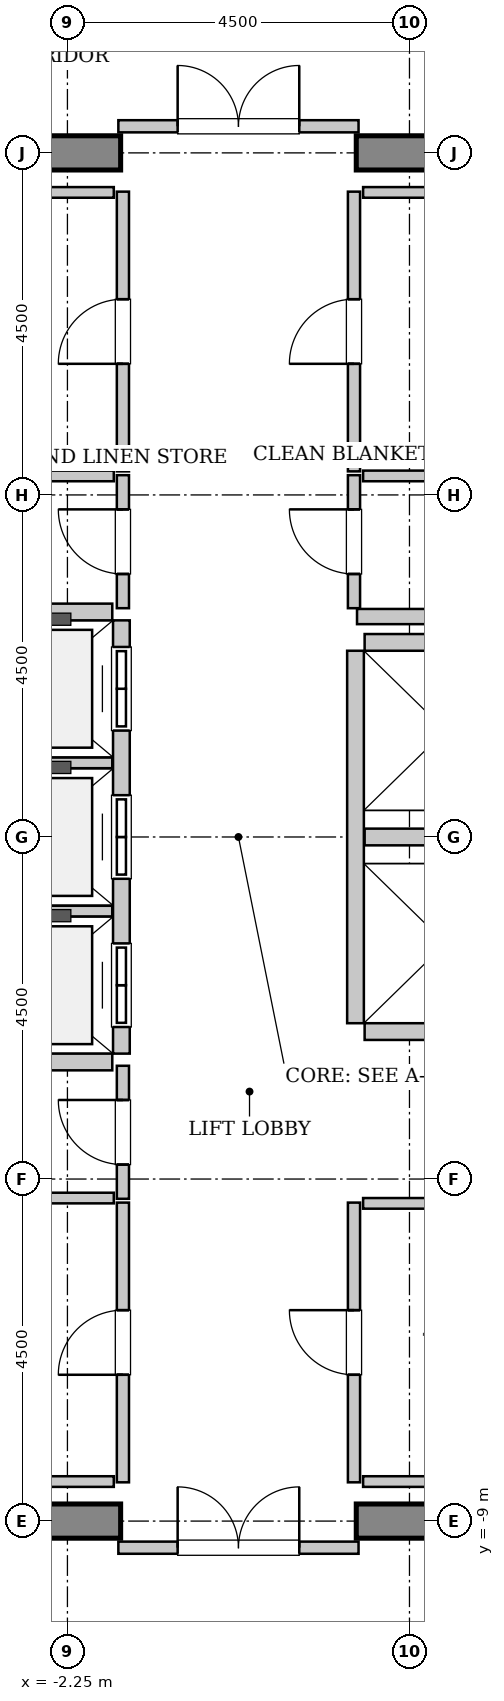
"""IFC4 building model, lengths in metres.
Left out: names, types, materials, properties, quantities, classifications, styles, units other than length and angle.
Written with IfcOpenShell. Run it as: python <this file> out.ifc"""

import sys

from ifc_helpers import new_model, si_unit, direction, frame, frame_2d, origin, place, context, subcontext, project, spatial, rectangle, extrude, source, transform, mapped, element, fill, save


model = new_model("IFC4")
c1 = context("Model", 3, precision=1e-05, world=origin(), true_north=direction((0.0, 1.0)))
c2 = subcontext(c1, "Body", "Model", "MODEL_VIEW")
j1 = project(units=[si_unit("LENGTHUNIT", "METRE"), si_unit("PLANEANGLEUNIT", "RADIAN")], contexts=[c1])
p1 = place(None, origin())
s1 = spatial("IfcSite", under=j1, at=p1, CompositionType="ELEMENT")
p2 = place(p1, origin())
s2 = spatial("IfcBuilding", under=s1, at=p2, CompositionType="ELEMENT")
p3 = place(p2, frame((0.0, 0.0, 298.8)))
s3 = spatial("IfcBuildingStorey", under=s2, at=p3, CompositionType="ELEMENT", Elevation=298.8)
m1 = source(origin(), c2, "Body", "SweptSolid", [
    extrude(rectangle(XDim=9.925, YDim=0.45, at=frame_2d((4.962, 0.0))), origin(), (0.0, 0.0, 1.0), 3.8),
])
for number, where, z_axis, x_axis in (
    (1, (-11.475, 9.0, 0.0), (0.0, 0.0, 1.0), (1.0, 0.0, 0.0)),
    (2, (1.55, 9.0, 0.0), (0.0, 0.0, 1.0), (1.0, 0.0, 0.0)),
    (3, (-11.475, -9.0, 0.0), (0.0, 0.0, 1.0), (1.0, 0.0, 0.0)),
    (4, (1.55, -9.0, 0.0), (0.0, 0.0, 1.0), (1.0, 0.0, 0.0)),
):
    element("IfcWall", number, at=place(p3, frame(where, z_axis=z_axis, x_axis=x_axis)), inside=s3, PredefinedType="SHEAR", context=c2, shape_type="MappedRepresentation", body=[
        mapped(m1, transform((0.0, 0.0, 0.0), x_axis=(1.0, 0.0, 0.0), y_axis=(0.0, 1.0, 0.0), z_axis=(0.0, 0.0, 1.0), scale=1.0)),
    ])
m2 = source(origin(), c2, "Body", "SweptSolid", [
    extrude(rectangle(XDim=5.7, YDim=0.22, at=frame_2d((2.85, 0.0))), origin(), (0.0, 0.0, 1.0), 3.535),
])
p4 = place(p3, frame((-1.54, -2.85, 0.0), z_axis=(0.0, 0.0, 1.0), x_axis=(0.0, 1.0, 0.0)))
e5 = element("IfcWall", 5, at=p4, inside=s3, PredefinedType="SOLIDWALL", context=c2, shape_type="MappedRepresentation", body=[
    mapped(m2, transform((0.0, 0.0, 0.0), x_axis=(1.0, 0.0, 0.0), y_axis=(0.0, 1.0, 0.0), z_axis=(0.0, 0.0, 1.0), scale=1.0)),
])
p5 = place(p4, frame((0.35, 0.0, 0.0)))
e6 = element("IfcOpeningElement", 6, at=p5, cuts=e5, PredefinedType="OPENING", context=c2, shape_type="SweptSolid", body=[
    extrude(rectangle(XDim=1.1, YDim=2.2, at=frame_2d((0.55, 1.1))), frame((0.0, 0.12, 0.0), z_axis=(0.0, -1.0, 0.0), x_axis=(1.0, 0.0, 0.0)), (0.0, 0.0, 1.0), 0.24),
])
p6 = place(p4, frame((2.3, 0.0, 0.0)))
e7 = element("IfcOpeningElement", 7, at=p6, cuts=e5, PredefinedType="OPENING", context=c2, shape_type="SweptSolid", body=[
    extrude(rectangle(XDim=1.1, YDim=2.2, at=frame_2d((0.55, 1.1))), frame((0.0, 0.12, 0.0), z_axis=(0.0, -1.0, 0.0), x_axis=(1.0, 0.0, 0.0)), (0.0, 0.0, 1.0), 0.24),
])
p7 = place(p4, frame((4.25, 0.0, 0.0)))
e8 = element("IfcOpeningElement", 8, at=p7, cuts=e5, PredefinedType="OPENING", context=c2, shape_type="SweptSolid", body=[
    extrude(rectangle(XDim=1.1, YDim=2.2, at=frame_2d((0.55, 1.1))), frame((0.0, 0.12, 0.0), z_axis=(0.0, -1.0, 0.0), x_axis=(1.0, 0.0, 0.0)), (0.0, 0.0, 1.0), 0.24),
])
m3 = source(origin(), c2, "Body", "SweptSolid", [
    extrude(rectangle(XDim=2.13, YDim=0.22, at=frame_2d((1.065, 0.0))), origin(), (0.0, 0.0, 1.0), 3.535),
])
p8 = place(p3, frame((-3.79, -2.96, 0.0), z_axis=(0.0, 0.0, 1.0), x_axis=(1.0, 0.0, 0.0)))
e9 = element("IfcWall", 9, at=p8, inside=s3, PredefinedType="SOLIDWALL", context=c2, shape_type="MappedRepresentation", body=[
    mapped(m3, transform((0.0, 0.0, 0.0), x_axis=(1.0, 0.0, 0.0), y_axis=(0.0, 1.0, 0.0), z_axis=(0.0, 0.0, 1.0), scale=1.0)),
])
m4 = source(origin(), c2, "Body", "SweptSolid", [
    extrude(rectangle(XDim=2.13, YDim=0.14, at=frame_2d((1.065, 0.0))), origin(), (0.0, 0.0, 1.0), 3.535),
])
for number, where, z_axis, x_axis in (
    (10, (-3.79, -0.975, 0.0), (0.0, 0.0, 1.0), (1.0, 0.0, 0.0)),
    (11, (-3.79, 0.975, 0.0), (0.0, 0.0, 1.0), (1.0, 0.0, 0.0)),
):
    element("IfcWall", number, at=place(p3, frame(where, z_axis=z_axis, x_axis=x_axis)), inside=s3, PredefinedType="PARTITIONING", context=c2, shape_type="MappedRepresentation", body=[
        mapped(m4, transform((0.0, 0.0, 0.0), x_axis=(1.0, 0.0, 0.0), y_axis=(0.0, 1.0, 0.0), z_axis=(0.0, 0.0, 1.0), scale=1.0)),
    ])
p9 = place(p3, frame((-1.66, 2.96, 0.0), z_axis=(0.0, 0.0, 1.0), x_axis=(-1.0, 0.0, 0.0)))
e12 = element("IfcWall", 12, at=p9, inside=s3, PredefinedType="SOLIDWALL", context=c2, shape_type="MappedRepresentation", body=[
    mapped(m3, transform((0.0, 0.0, 0.0), x_axis=(1.0, 0.0, 0.0), y_axis=(0.0, 1.0, 0.0), z_axis=(0.0, 0.0, 1.0), scale=1.0)),
])
m5 = source(origin(), c2, "Body", "SweptSolid", [
    extrude(rectangle(XDim=4.9, YDim=0.22, at=frame_2d((2.45, 0.0))), origin(), (0.0, 0.0, 1.0), 3.535),
])
p10 = place(p3, frame((1.54, 2.45, 0.0), z_axis=(0.0, 0.0, 1.0), x_axis=(0.0, -1.0, 0.0)))
e13 = element("IfcWall", 13, at=p10, inside=s3, PredefinedType="SOLIDWALL", context=c2, shape_type="MappedRepresentation", body=[
    mapped(m5, transform((0.0, 0.0, 0.0), x_axis=(1.0, 0.0, 0.0), y_axis=(0.0, 1.0, 0.0), z_axis=(0.0, 0.0, 1.0), scale=1.0)),
])
for number, where, z_axis, x_axis in (
    (14, (1.66, -2.56, 0.0), (0.0, 0.0, 1.0), (1.0, 0.0, 0.0)),
    (15, (1.66, 0.0, 0.0), (0.0, 0.0, 1.0), (1.0, 0.0, 0.0)),
    (16, (3.79, 2.56, 0.0), (0.0, 0.0, 1.0), (-1.0, 0.0, 0.0)),
):
    element("IfcWall", number, at=place(p3, frame(where, z_axis=z_axis, x_axis=x_axis)), inside=s3, PredefinedType="SOLIDWALL", context=c2, shape_type="MappedRepresentation", body=[
        mapped(m3, transform((0.0, 0.0, 0.0), x_axis=(1.0, 0.0, 0.0), y_axis=(0.0, 1.0, 0.0), z_axis=(0.0, 0.0, 1.0), scale=1.0)),
    ])
m6 = source(origin(), c2, "Body", "SweptSolid", [
    extrude(rectangle(XDim=2.52, YDim=0.2, at=frame_2d((1.26, 0.0))), origin(), (0.0, 0.0, 1.0), 3.535),
])
p11 = place(p3, frame((1.56, 2.9, 0.0), z_axis=(0.0, 0.0, 1.0), x_axis=(1.0, 0.0, 0.0)))
e17 = element("IfcWall", 17, at=p11, inside=s3, PredefinedType="PARTITIONING", context=c2, shape_type="MappedRepresentation", body=[
    mapped(m6, transform((0.0, 0.0, 0.0), x_axis=(1.0, 0.0, 0.0), y_axis=(0.0, 1.0, 0.0), z_axis=(0.0, 0.0, 1.0), scale=1.0)),
])
m7 = source(origin(), c2, "Body", "SweptSolid", [
    extrude(rectangle(XDim=3.16, YDim=0.16, at=frame_2d((1.58, 0.0))), origin(), (0.0, 0.0, 1.0), 2.625),
])
p12 = place(p3, frame((-1.58, 9.35, 0.0), z_axis=(0.0, 0.0, 1.0), x_axis=(1.0, 0.0, 0.0)))
e18 = element("IfcWall", 18, at=p12, inside=s3, PredefinedType="PARTITIONING", context=c2, shape_type="MappedRepresentation", body=[
    mapped(m7, transform((0.0, 0.0, 0.0), x_axis=(1.0, 0.0, 0.0), y_axis=(0.0, 1.0, 0.0), z_axis=(0.0, 0.0, 1.0), scale=1.0)),
])
p13 = place(p12, frame((0.78, 0.0, 0.0)))
e19 = element("IfcOpeningElement", 19, at=p13, cuts=e18, PredefinedType="OPENING", context=c2, shape_type="SweptSolid", body=[
    extrude(rectangle(XDim=1.6, YDim=2.3, at=frame_2d((0.8, 1.15))), frame((0.0, 0.09, 0.0), z_axis=(0.0, -1.0, 0.0), x_axis=(1.0, 0.0, 0.0)), (0.0, 0.0, 1.0), 0.18),
])
p14 = place(p3, frame((-1.58, -9.35, 0.0), z_axis=(0.0, 0.0, 1.0), x_axis=(1.0, 0.0, 0.0)))
e20 = element("IfcWall", 20, at=p14, inside=s3, PredefinedType="PARTITIONING", context=c2, shape_type="MappedRepresentation", body=[
    mapped(m7, transform((0.0, 0.0, 0.0), x_axis=(1.0, 0.0, 0.0), y_axis=(0.0, 1.0, 0.0), z_axis=(0.0, 0.0, 1.0), scale=1.0)),
])
p15 = place(p14, frame((0.78, 0.0, 0.0)))
e21 = element("IfcOpeningElement", 21, at=p15, cuts=e20, PredefinedType="OPENING", context=c2, shape_type="SweptSolid", body=[
    extrude(rectangle(XDim=1.6, YDim=2.3, at=frame_2d((0.8, 1.15))), frame((0.0, 0.09, 0.0), z_axis=(0.0, -1.0, 0.0), x_axis=(1.0, 0.0, 0.0)), (0.0, 0.0, 1.0), 0.18),
])
m8 = source(origin(), c2, "Body", "SweptSolid", [
    extrude(rectangle(XDim=1.75, YDim=0.16, at=frame_2d((0.875, 0.0))), origin(), (0.0, 0.0, 1.0), 3.535),
])
p16 = place(p3, frame((-1.52, 3.01, 0.0), z_axis=(0.0, 0.0, 1.0), x_axis=(0.0, 1.0, 0.0)))
e22 = element("IfcWall", 22, at=p16, inside=s3, PredefinedType="PARTITIONING", context=c2, shape_type="MappedRepresentation", body=[
    mapped(m8, transform((0.0, 0.0, 0.0), x_axis=(1.0, 0.0, 0.0), y_axis=(0.0, 1.0, 0.0), z_axis=(0.0, 0.0, 1.0), scale=1.0)),
])
p17 = place(p16, frame((0.45, 0.0, 0.0)))
e23 = element("IfcOpeningElement", 23, at=p17, cuts=e22, PredefinedType="OPENING", context=c2, shape_type="SweptSolid", body=[
    extrude(rectangle(XDim=0.85, YDim=2.1, at=frame_2d((0.425, 1.05))), frame((0.0, 0.09, 0.0), z_axis=(0.0, -1.0, 0.0), x_axis=(1.0, 0.0, 0.0)), (0.0, 0.0, 1.0), 0.18),
])
m9 = source(origin(), c2, "Body", "SweptSolid", [
    extrude(rectangle(XDim=2.95, YDim=0.14, at=frame_2d((1.475, 0.0))), origin(), (0.0, 0.0, 1.0), 3.535),
])
p18 = place(p3, frame((-4.59, 4.75, 0.0), z_axis=(0.0, 0.0, 1.0), x_axis=(1.0, 0.0, 0.0)))
e24 = element("IfcWall", 24, at=p18, inside=s3, PredefinedType="PARTITIONING", context=c2, shape_type="MappedRepresentation", body=[
    mapped(m9, transform((0.0, 0.0, 0.0), x_axis=(1.0, 0.0, 0.0), y_axis=(0.0, 1.0, 0.0), z_axis=(0.0, 0.0, 1.0), scale=1.0)),
])
m10 = source(origin(), c2, "Body", "SweptSolid", [
    extrude(rectangle(XDim=3.68, YDim=0.16, at=frame_2d((1.84, 0.0))), origin(), (0.0, 0.0, 1.0), 3.535),
])
p19 = place(p3, frame((-1.52, 4.81, 0.0), z_axis=(0.0, 0.0, 1.0), x_axis=(0.0, 1.0, 0.0)))
e25 = element("IfcWall", 25, at=p19, inside=s3, PredefinedType="PARTITIONING", context=c2, shape_type="MappedRepresentation", body=[
    mapped(m10, transform((0.0, 0.0, 0.0), x_axis=(1.0, 0.0, 0.0), y_axis=(0.0, 1.0, 0.0), z_axis=(0.0, 0.0, 1.0), scale=1.0)),
])
p20 = place(p19, frame((1.415, 0.0, 0.0)))
e26 = element("IfcOpeningElement", 26, at=p20, cuts=e25, PredefinedType="OPENING", context=c2, shape_type="SweptSolid", body=[
    extrude(rectangle(XDim=0.85, YDim=2.1, at=frame_2d((0.425, 1.05))), frame((0.0, 0.09, 0.0), z_axis=(0.0, -1.0, 0.0), x_axis=(1.0, 0.0, 0.0)), (0.0, 0.0, 1.0), 0.18),
])
m11 = source(origin(), c2, "Body", "SweptSolid", [
    extrude(rectangle(XDim=3.15, YDim=0.14, at=frame_2d((1.575, 0.0))), origin(), (0.0, 0.0, 1.0), 3.535),
])
p21 = place(p3, frame((-4.79, 8.48, 0.0), z_axis=(0.0, 0.0, 1.0), x_axis=(1.0, 0.0, 0.0)))
e27 = element("IfcWall", 27, at=p21, inside=s3, PredefinedType="PARTITIONING", context=c2, shape_type="MappedRepresentation", body=[
    mapped(m11, transform((0.0, 0.0, 0.0), x_axis=(1.0, 0.0, 0.0), y_axis=(0.0, 1.0, 0.0), z_axis=(0.0, 0.0, 1.0), scale=1.0)),
])
p22 = place(p3, frame((1.52, 3.01, 0.0), z_axis=(0.0, 0.0, 1.0), x_axis=(0.0, 1.0, 0.0)))
e28 = element("IfcWall", 28, at=p22, inside=s3, PredefinedType="PARTITIONING", context=c2, shape_type="MappedRepresentation", body=[
    mapped(m8, transform((0.0, 0.0, 0.0), x_axis=(1.0, 0.0, 0.0), y_axis=(0.0, 1.0, 0.0), z_axis=(0.0, 0.0, 1.0), scale=1.0)),
])
p23 = place(p22, frame((0.45, 0.0, 0.0)))
e29 = element("IfcOpeningElement", 29, at=p23, cuts=e28, PredefinedType="OPENING", context=c2, shape_type="SweptSolid", body=[
    extrude(rectangle(XDim=0.85, YDim=2.1, at=frame_2d((0.425, 1.05))), frame((0.0, 0.09, 0.0), z_axis=(0.0, -1.0, 0.0), x_axis=(1.0, 0.0, 0.0)), (0.0, 0.0, 1.0), 0.18),
])
p24 = place(p3, frame((1.64, 4.75, 0.0), z_axis=(0.0, 0.0, 1.0), x_axis=(1.0, 0.0, 0.0)))
e30 = element("IfcWall", 30, at=p24, inside=s3, PredefinedType="PARTITIONING", context=c2, shape_type="MappedRepresentation", body=[
    mapped(m11, transform((0.0, 0.0, 0.0), x_axis=(1.0, 0.0, 0.0), y_axis=(0.0, 1.0, 0.0), z_axis=(0.0, 0.0, 1.0), scale=1.0)),
])
p25 = place(p3, frame((1.52, 4.81, 0.0), z_axis=(0.0, 0.0, 1.0), x_axis=(0.0, 1.0, 0.0)))
e31 = element("IfcWall", 31, at=p25, inside=s3, PredefinedType="PARTITIONING", context=c2, shape_type="MappedRepresentation", body=[
    mapped(m10, transform((0.0, 0.0, 0.0), x_axis=(1.0, 0.0, 0.0), y_axis=(0.0, 1.0, 0.0), z_axis=(0.0, 0.0, 1.0), scale=1.0)),
])
p26 = place(p25, frame((1.415, 0.0, 0.0)))
e32 = element("IfcOpeningElement", 32, at=p26, cuts=e31, PredefinedType="OPENING", context=c2, shape_type="SweptSolid", body=[
    extrude(rectangle(XDim=0.85, YDim=2.1, at=frame_2d((0.425, 1.05))), frame((0.0, 0.09, 0.0), z_axis=(0.0, -1.0, 0.0), x_axis=(1.0, 0.0, 0.0)), (0.0, 0.0, 1.0), 0.18),
])
p27 = place(p3, frame((1.64, 8.48, 0.0), z_axis=(0.0, 0.0, 1.0), x_axis=(1.0, 0.0, 0.0)))
e33 = element("IfcWall", 33, at=p27, inside=s3, PredefinedType="PARTITIONING", context=c2, shape_type="MappedRepresentation", body=[
    mapped(m11, transform((0.0, 0.0, 0.0), x_axis=(1.0, 0.0, 0.0), y_axis=(0.0, 1.0, 0.0), z_axis=(0.0, 0.0, 1.0), scale=1.0)),
])
p28 = place(p3, frame((-1.52, -4.76, 0.0), z_axis=(0.0, 0.0, 1.0), x_axis=(0.0, 1.0, 0.0)))
e34 = element("IfcWall", 34, at=p28, inside=s3, PredefinedType="PARTITIONING", context=c2, shape_type="MappedRepresentation", body=[
    mapped(m8, transform((0.0, 0.0, 0.0), x_axis=(1.0, 0.0, 0.0), y_axis=(0.0, 1.0, 0.0), z_axis=(0.0, 0.0, 1.0), scale=1.0)),
])
p29 = place(p28, frame((0.45, 0.0, 0.0)))
e35 = element("IfcOpeningElement", 35, at=p29, cuts=e34, PredefinedType="OPENING", context=c2, shape_type="SweptSolid", body=[
    extrude(rectangle(XDim=0.85, YDim=2.1, at=frame_2d((0.425, 1.05))), frame((0.0, 0.09, 0.0), z_axis=(0.0, -1.0, 0.0), x_axis=(1.0, 0.0, 0.0)), (0.0, 0.0, 1.0), 0.18),
])
p30 = place(p3, frame((-4.79, -4.75, 0.0), z_axis=(0.0, 0.0, 1.0), x_axis=(1.0, 0.0, 0.0)))
e36 = element("IfcWall", 36, at=p30, inside=s3, PredefinedType="PARTITIONING", context=c2, shape_type="MappedRepresentation", body=[
    mapped(m11, transform((0.0, 0.0, 0.0), x_axis=(1.0, 0.0, 0.0), y_axis=(0.0, 1.0, 0.0), z_axis=(0.0, 0.0, 1.0), scale=1.0)),
])
p31 = place(p3, frame((-1.52, -8.49, 0.0), z_axis=(0.0, 0.0, 1.0), x_axis=(0.0, 1.0, 0.0)))
e37 = element("IfcWall", 37, at=p31, inside=s3, PredefinedType="PARTITIONING", context=c2, shape_type="MappedRepresentation", body=[
    mapped(m10, transform((0.0, 0.0, 0.0), x_axis=(1.0, 0.0, 0.0), y_axis=(0.0, 1.0, 0.0), z_axis=(0.0, 0.0, 1.0), scale=1.0)),
])
p32 = place(p31, frame((1.415, 0.0, 0.0)))
e38 = element("IfcOpeningElement", 38, at=p32, cuts=e37, PredefinedType="OPENING", context=c2, shape_type="SweptSolid", body=[
    extrude(rectangle(XDim=0.85, YDim=2.1, at=frame_2d((0.425, 1.05))), frame((0.0, 0.09, 0.0), z_axis=(0.0, -1.0, 0.0), x_axis=(1.0, 0.0, 0.0)), (0.0, 0.0, 1.0), 0.18),
])
m12 = source(origin(), c2, "Body", "SweptSolid", [
    extrude(rectangle(XDim=3.03, YDim=0.14, at=frame_2d((1.515, 0.0))), origin(), (0.0, 0.0, 1.0), 3.535),
])
p33 = place(p3, frame((-4.67, -8.48, 0.0), z_axis=(0.0, 0.0, 1.0), x_axis=(1.0, 0.0, 0.0)))
e39 = element("IfcWall", 39, at=p33, inside=s3, PredefinedType="PARTITIONING", context=c2, shape_type="MappedRepresentation", body=[
    mapped(m12, transform((0.0, 0.0, 0.0), x_axis=(1.0, 0.0, 0.0), y_axis=(0.0, 1.0, 0.0), z_axis=(0.0, 0.0, 1.0), scale=1.0)),
])
p34 = place(p3, frame((1.52, -8.49, 0.0), z_axis=(0.0, 0.0, 1.0), x_axis=(0.0, 1.0, 0.0)))
e40 = element("IfcWall", 40, at=p34, inside=s3, PredefinedType="PARTITIONING", context=c2, shape_type="MappedRepresentation", body=[
    mapped(m10, transform((0.0, 0.0, 0.0), x_axis=(1.0, 0.0, 0.0), y_axis=(0.0, 1.0, 0.0), z_axis=(0.0, 0.0, 1.0), scale=1.0)),
])
p35 = place(p34, frame((1.415, 0.0, 0.0)))
e41 = element("IfcOpeningElement", 41, at=p35, cuts=e40, PredefinedType="OPENING", context=c2, shape_type="SweptSolid", body=[
    extrude(rectangle(XDim=0.85, YDim=2.1, at=frame_2d((0.425, 1.05))), frame((0.0, 0.09, 0.0), z_axis=(0.0, -1.0, 0.0), x_axis=(1.0, 0.0, 0.0)), (0.0, 0.0, 1.0), 0.18),
])
p36 = place(p3, frame((1.64, -4.82, 0.0), z_axis=(0.0, 0.0, 1.0), x_axis=(1.0, 0.0, 0.0)))
e42 = element("IfcWall", 42, at=p36, inside=s3, PredefinedType="PARTITIONING", context=c2, shape_type="MappedRepresentation", body=[
    mapped(m9, transform((0.0, 0.0, 0.0), x_axis=(1.0, 0.0, 0.0), y_axis=(0.0, 1.0, 0.0), z_axis=(0.0, 0.0, 1.0), scale=1.0)),
])
p37 = place(p3, frame((1.64, -8.48, 0.0), z_axis=(0.0, 0.0, 1.0), x_axis=(1.0, 0.0, 0.0)))
e43 = element("IfcWall", 43, at=p37, inside=s3, PredefinedType="PARTITIONING", context=c2, shape_type="MappedRepresentation", body=[
    mapped(m11, transform((0.0, 0.0, 0.0), x_axis=(1.0, 0.0, 0.0), y_axis=(0.0, 1.0, 0.0), z_axis=(0.0, 0.0, 1.0), scale=1.0)),
])
m13 = source(origin(), c2, "Body", "SweptSolid", [
    extrude(rectangle(XDim=1.1, YDim=2.2, at=frame_2d((0.55, 1.1))), frame((0.0, 0.025, 0.0), z_axis=(0.0, -1.0, 0.0), x_axis=(1.0, 0.0, 0.0)), (0.0, 0.0, 1.0), 0.05),
])
p38 = place(p5, origin())
e44 = element("IfcDoor", 44, at=p38, inside=s3, OperationType="DOUBLE_DOOR_SLIDING", PredefinedType="DOOR", context=c2, shape_type="MappedRepresentation", body=[
    mapped(m13, transform((0.0, 0.0, 0.0), x_axis=(1.0, 0.0, 0.0), y_axis=(0.0, 1.0, 0.0), z_axis=(0.0, 0.0, 1.0), scale=1.0)),
])
fill(e6, e44)
p39 = place(p6, origin())
e45 = element("IfcDoor", 45, at=p39, inside=s3, OperationType="DOUBLE_DOOR_SLIDING", PredefinedType="DOOR", context=c2, shape_type="MappedRepresentation", body=[
    mapped(m13, transform((0.0, 0.0, 0.0), x_axis=(1.0, 0.0, 0.0), y_axis=(0.0, 1.0, 0.0), z_axis=(0.0, 0.0, 1.0), scale=1.0)),
])
fill(e7, e45)
p40 = place(p7, origin())
e46 = element("IfcDoor", 46, at=p40, inside=s3, OperationType="DOUBLE_DOOR_SLIDING", PredefinedType="DOOR", context=c2, shape_type="MappedRepresentation", body=[
    mapped(m13, transform((0.0, 0.0, 0.0), x_axis=(1.0, 0.0, 0.0), y_axis=(0.0, 1.0, 0.0), z_axis=(0.0, 0.0, 1.0), scale=1.0)),
])
fill(e8, e46)
m14 = source(origin(), c2, "Body", "SweptSolid", [
    extrude(rectangle(XDim=1.6, YDim=2.3, at=frame_2d((0.8, 1.15))), frame((0.0, 0.025, 0.0), z_axis=(0.0, -1.0, 0.0), x_axis=(1.0, 0.0, 0.0)), (0.0, 0.0, 1.0), 0.05),
])
p41 = place(p13, origin())
e47 = element("IfcDoor", 47, at=p41, inside=s3, OperationType="DOUBLE_DOOR_SINGLE_SWING", PredefinedType="DOOR", context=c2, shape_type="MappedRepresentation", body=[
    mapped(m14, transform((0.0, 0.0, 0.0), x_axis=(1.0, 0.0, 0.0), y_axis=(0.0, 1.0, 0.0), z_axis=(0.0, 0.0, 1.0), scale=1.0)),
])
fill(e19, e47)
p42 = place(p15, origin())
e48 = element("IfcDoor", 48, at=p42, inside=s3, OperationType="DOUBLE_DOOR_SINGLE_SWING", PredefinedType="DOOR", context=c2, shape_type="MappedRepresentation", body=[
    mapped(m14, transform((0.0, 0.0, 0.0), x_axis=(1.0, 0.0, 0.0), y_axis=(0.0, 1.0, 0.0), z_axis=(0.0, 0.0, 1.0), scale=1.0)),
])
fill(e21, e48)
m15 = source(origin(), c2, "Body", "SweptSolid", [
    extrude(rectangle(XDim=0.85, YDim=2.1, at=frame_2d((0.425, 1.05))), frame((0.0, 0.025, 0.0), z_axis=(0.0, -1.0, 0.0), x_axis=(1.0, 0.0, 0.0)), (0.0, 0.0, 1.0), 0.05),
])
p43 = place(p17, origin())
e49 = element("IfcDoor", 49, at=p43, inside=s3, OperationType="SINGLE_SWING_RIGHT", PredefinedType="DOOR", context=c2, shape_type="MappedRepresentation", body=[
    mapped(m15, transform((0.0, 0.0, 0.0), x_axis=(1.0, 0.0, 0.0), y_axis=(0.0, 1.0, 0.0), z_axis=(0.0, 0.0, 1.0), scale=1.0)),
])
fill(e23, e49)
p44 = place(p20, origin())
e50 = element("IfcDoor", 50, at=p44, inside=s3, OperationType="SINGLE_SWING_LEFT", PredefinedType="DOOR", context=c2, shape_type="MappedRepresentation", body=[
    mapped(m15, transform((0.0, 0.0, 0.0), x_axis=(1.0, 0.0, 0.0), y_axis=(0.0, 1.0, 0.0), z_axis=(0.0, 0.0, 1.0), scale=1.0)),
])
fill(e26, e50)
p45 = place(p23, origin())
e51 = element("IfcDoor", 51, at=p45, inside=s3, OperationType="SINGLE_SWING_RIGHT", PredefinedType="DOOR", context=c2, shape_type="MappedRepresentation", body=[
    mapped(m15, transform((0.0, 0.0, 0.0), x_axis=(1.0, 0.0, 0.0), y_axis=(0.0, 1.0, 0.0), z_axis=(0.0, 0.0, 1.0), scale=1.0)),
])
fill(e29, e51)
p46 = place(p26, origin())
e52 = element("IfcDoor", 52, at=p46, inside=s3, OperationType="SINGLE_SWING_LEFT", PredefinedType="DOOR", context=c2, shape_type="MappedRepresentation", body=[
    mapped(m15, transform((0.0, 0.0, 0.0), x_axis=(1.0, 0.0, 0.0), y_axis=(0.0, 1.0, 0.0), z_axis=(0.0, 0.0, 1.0), scale=1.0)),
])
fill(e32, e52)
p47 = place(p29, origin())
e53 = element("IfcDoor", 53, at=p47, inside=s3, OperationType="SINGLE_SWING_RIGHT", PredefinedType="DOOR", context=c2, shape_type="MappedRepresentation", body=[
    mapped(m15, transform((0.0, 0.0, 0.0), x_axis=(1.0, 0.0, 0.0), y_axis=(0.0, 1.0, 0.0), z_axis=(0.0, 0.0, 1.0), scale=1.0)),
])
fill(e35, e53)
p48 = place(p32, origin())
e54 = element("IfcDoor", 54, at=p48, inside=s3, OperationType="SINGLE_SWING_LEFT", PredefinedType="DOOR", context=c2, shape_type="MappedRepresentation", body=[
    mapped(m15, transform((0.0, 0.0, 0.0), x_axis=(1.0, 0.0, 0.0), y_axis=(0.0, 1.0, 0.0), z_axis=(0.0, 0.0, 1.0), scale=1.0)),
])
fill(e38, e54)
p49 = place(p35, origin())
e55 = element("IfcDoor", 55, at=p49, inside=s3, OperationType="SINGLE_SWING_RIGHT", PredefinedType="DOOR", context=c2, shape_type="MappedRepresentation", body=[
    mapped(m15, transform((0.0, 0.0, 0.0), x_axis=(1.0, 0.0, 0.0), y_axis=(0.0, 1.0, 0.0), z_axis=(0.0, 0.0, 1.0), scale=1.0)),
])
fill(e41, e55)
save(model, sys.argv[1])
